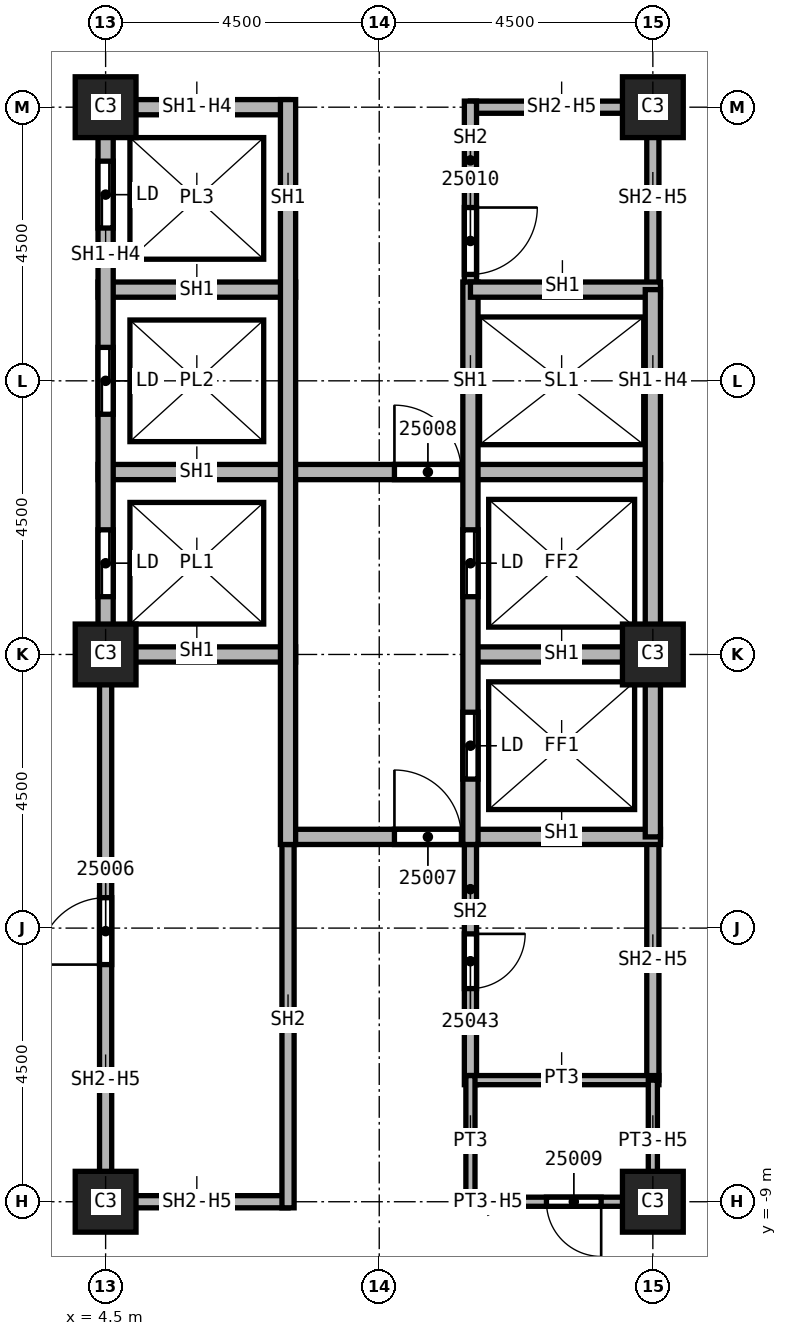
"""IFC4 building model, lengths in metres.
Left out: names, types, materials, properties, quantities, classifications, styles, units other than length and angle.
Written with IfcOpenShell. Run it as: python <this file> out.ifc"""

import sys

from ifc_helpers import new_model, si_unit, direction, frame, frame_2d, origin, origin_2d, place, context, subcontext, project, spatial, rectangle, extrude, element, fill, save


model = new_model("IFC4")
c1 = context("Model", 3, precision=1e-05, world=origin(), true_north=direction((0.0, 1.0)))
c2 = subcontext(c1, "Body", "Model", "MODEL_VIEW")
j1 = project(units=[si_unit("LENGTHUNIT", "METRE"), si_unit("PLANEANGLEUNIT", "RADIAN")], contexts=[c1])
p1 = place(None, origin())
s1 = spatial("IfcSite", under=j1, at=p1, CompositionType="ELEMENT")
p2 = place(p1, origin())
s2 = spatial("IfcBuilding", under=s1, at=p2, CompositionType="ELEMENT")
p3 = place(p2, frame((0.0, 0.0, 60.0)))
s3 = spatial("IfcBuildingStorey", under=s2, at=p3, CompositionType="ELEMENT", Elevation=60.0)
for number, where, z_axis, x_axis in (
    (1, (4.5, 0.0, 0.0), (0.0, 0.0, 1.0), (1.0, 0.0, 0.0)),
    (2, (4.5, 9.0, 0.0), (0.0, 0.0, 1.0), (1.0, 0.0, 0.0)),
    (3, (4.5, -9.0, 0.0), (0.0, 0.0, 1.0), (1.0, 0.0, 0.0)),
    (4, (13.5, 0.0, 0.0), (0.0, 0.0, 1.0), (1.0, 0.0, 0.0)),
    (5, (13.5, 9.0, 0.0), (0.0, 0.0, 1.0), (1.0, 0.0, 0.0)),
    (6, (13.5, -9.0, 0.0), (0.0, 0.0, 1.0), (1.0, 0.0, 0.0)),
):
    element("IfcColumn", number, at=place(p3, frame(where, z_axis=z_axis, x_axis=x_axis)), inside=s3, PredefinedType="COLUMN", context=c2, shape_type="SweptSolid", body=[
        extrude(rectangle(XDim=1.0, YDim=1.0, at=origin_2d()), origin(), (0.0, 0.0, 1.0), 7.7),
    ])
p4 = place(p3, frame((4.5, -9.1, 0.0), z_axis=(0.0, 0.0, 1.0), x_axis=(0.0, 1.0, 0.0)))
e7 = element("IfcWall", 7, at=p4, inside=s3, PredefinedType="SOLIDWALL", context=c2, shape_type="SweptSolid", body=[
    extrude(rectangle(XDim=9.1, YDim=0.2, at=frame_2d((4.55, 0.0))), origin(), (0.0, 0.0, 1.0), 6.938),
])
p5 = place(p4, frame((4.0, 0.0, 0.0)))
e8 = element("IfcOpeningElement", 8, at=p5, cuts=e7, PredefinedType="OPENING", context=c2, shape_type="SweptSolid", body=[
    extrude(rectangle(XDim=1.1, YDim=2.1, at=frame_2d((0.55, 1.05))), frame((0.0, 0.1, 0.0), z_axis=(0.0, -1.0, 0.0), x_axis=(1.0, 0.0, 0.0)), (0.0, 0.0, 1.0), 0.2),
])
p6 = place(p3, frame((7.5, -9.0, 0.0), z_axis=(0.0, 0.0, 1.0), x_axis=(-1.0, 0.0, 0.0)))
e9 = element("IfcWall", 9, at=p6, inside=s3, PredefinedType="SOLIDWALL", context=c2, shape_type="SweptSolid", body=[
    extrude(rectangle(XDim=3.0, YDim=0.2, at=frame_2d((1.5, 0.0))), origin(), (0.0, 0.0, 1.0), 6.938),
])
p7 = place(p3, frame((7.5, -2.875, 0.0), z_axis=(0.0, 0.0, 1.0), x_axis=(0.0, -1.0, 0.0)))
e10 = element("IfcWall", 10, at=p7, inside=s3, PredefinedType="SOLIDWALL", context=c2, shape_type="SweptSolid", body=[
    extrude(rectangle(XDim=6.225, YDim=0.2, at=frame_2d((3.113, 0.0))), origin(), (0.0, 0.0, 1.0), 7.7),
])
p8 = place(p3, frame((10.5, -2.875, 0.0), z_axis=(0.0, 0.0, 1.0), x_axis=(0.0, -1.0, 0.0)))
e11 = element("IfcWall", 11, at=p8, inside=s3, PredefinedType="SOLIDWALL", context=c2, shape_type="SweptSolid", body=[
    extrude(rectangle(XDim=4.2, YDim=0.2, at=frame_2d((2.1, 0.0))), origin(), (0.0, 0.0, 1.0), 7.7),
])
p9 = place(p8, frame((1.72, 0.0, 0.0)))
e12 = element("IfcOpeningElement", 12, at=p9, cuts=e11, PredefinedType="OPENING", context=c2, shape_type="SweptSolid", body=[
    extrude(rectangle(XDim=0.9, YDim=2.1, at=frame_2d((0.45, 1.05))), frame((0.0, 0.1, 0.0), z_axis=(0.0, -1.0, 0.0), x_axis=(1.0, 0.0, 0.0)), (0.0, 0.0, 1.0), 0.2),
])
p10 = place(p3, frame((10.5, 9.0, 0.0), z_axis=(0.0, 0.0, 1.0), x_axis=(1.0, 0.0, 0.0)))
e13 = element("IfcWall", 13, at=p10, inside=s3, PredefinedType="SOLIDWALL", context=c2, shape_type="SweptSolid", body=[
    extrude(rectangle(XDim=3.0, YDim=0.2, at=frame_2d((1.5, 0.0))), origin(), (0.0, 0.0, 1.0), 6.938),
])
p11 = place(p3, frame((10.5, 9.1, 0.0), z_axis=(0.0, 0.0, 1.0), x_axis=(0.0, -1.0, 0.0)))
e14 = element("IfcWall", 14, at=p11, inside=s3, PredefinedType="SOLIDWALL", context=c2, shape_type="SweptSolid", body=[
    extrude(rectangle(XDim=3.225, YDim=0.2, at=frame_2d((1.613, 0.0))), origin(), (0.0, 0.0, 1.0), 7.7),
])
p12 = place(p11, frame((1.75, 0.0, 0.0)))
e15 = element("IfcOpeningElement", 15, at=p12, cuts=e14, PredefinedType="OPENING", context=c2, shape_type="SweptSolid", body=[
    extrude(rectangle(XDim=1.1, YDim=2.1, at=frame_2d((0.55, 1.05))), frame((0.0, 0.1, 0.0), z_axis=(0.0, -1.0, 0.0), x_axis=(1.0, 0.0, 0.0)), (0.0, 0.0, 1.0), 0.2),
])
p13 = place(p3, frame((13.5, -3.0, 0.0), z_axis=(0.0, 0.0, 1.0), x_axis=(0.0, -1.0, 0.0)))
e16 = element("IfcWall", 16, at=p13, inside=s3, PredefinedType="SOLIDWALL", context=c2, shape_type="SweptSolid", body=[
    extrude(rectangle(XDim=4.0, YDim=0.2, at=frame_2d((2.0, 0.0))), origin(), (0.0, 0.0, 1.0), 6.938),
])
p14 = place(p3, frame((13.5, 9.1, 0.0), z_axis=(0.0, 0.0, 1.0), x_axis=(0.0, -1.0, 0.0)))
e17 = element("IfcWall", 17, at=p14, inside=s3, PredefinedType="SOLIDWALL", context=c2, shape_type="SweptSolid", body=[
    extrude(rectangle(XDim=3.1, YDim=0.2, at=frame_2d((1.55, 0.0))), origin(), (0.0, 0.0, 1.0), 6.938),
])
p15 = place(p3, frame((4.375, 0.0, 0.0), z_axis=(0.0, 0.0, 1.0), x_axis=(1.0, 0.0, 0.0)))
e18 = element("IfcWall", 18, at=p15, inside=s3, PredefinedType="SOLIDWALL", context=c2, shape_type="SweptSolid", body=[
    extrude(rectangle(XDim=3.25, YDim=0.25, at=frame_2d((1.625, 0.0))), origin(), (0.0, 0.0, 1.0), 7.7),
])
p16 = place(p3, frame((4.375, 3.0, 0.0), z_axis=(0.0, 0.0, 1.0), x_axis=(1.0, 0.0, 0.0)))
e19 = element("IfcWall", 19, at=p16, inside=s3, PredefinedType="SOLIDWALL", context=c2, shape_type="SweptSolid", body=[
    extrude(rectangle(XDim=9.25, YDim=0.25, at=frame_2d((4.625, 0.0))), origin(), (0.0, 0.0, 1.0), 7.7),
])
p17 = place(p16, frame((4.875, 0.0, 0.0)))
e20 = element("IfcOpeningElement", 20, at=p17, cuts=e19, PredefinedType="OPENING", context=c2, shape_type="SweptSolid", body=[
    extrude(rectangle(XDim=1.1, YDim=2.1, at=frame_2d((0.55, 1.05))), frame((0.0, 0.125, 0.0), z_axis=(0.0, -1.0, 0.0), x_axis=(1.0, 0.0, 0.0)), (0.0, 0.0, 1.0), 0.25),
])
p18 = place(p3, frame((4.375, 6.0, 0.0), z_axis=(0.0, 0.0, 1.0), x_axis=(1.0, 0.0, 0.0)))
e21 = element("IfcWall", 21, at=p18, inside=s3, PredefinedType="SOLIDWALL", context=c2, shape_type="SweptSolid", body=[
    extrude(rectangle(XDim=3.25, YDim=0.25, at=frame_2d((1.625, 0.0))), origin(), (0.0, 0.0, 1.0), 7.7),
])
p19 = place(p3, frame((4.5, 0.0, 0.0), z_axis=(0.0, 0.0, 1.0), x_axis=(0.0, 1.0, 0.0)))
e22 = element("IfcWall", 22, at=p19, inside=s3, PredefinedType="SOLIDWALL", context=c2, shape_type="SweptSolid", body=[
    extrude(rectangle(XDim=9.125, YDim=0.25, at=frame_2d((4.562, 0.0))), origin(), (0.0, 0.0, 1.0), 6.938),
])
p20 = place(p19, frame((0.95, 0.0, 0.0)))
e23 = element("IfcOpeningElement", 23, at=p20, cuts=e22, PredefinedType="OPENING", context=c2, shape_type="SweptSolid", body=[
    extrude(rectangle(XDim=1.1, YDim=2.1, at=frame_2d((0.55, 1.05))), frame((0.0, 0.125, 0.0), z_axis=(0.0, -1.0, 0.0), x_axis=(1.0, 0.0, 0.0)), (0.0, 0.0, 1.0), 0.25),
])
p21 = place(p19, frame((3.95, 0.0, 0.0)))
e24 = element("IfcOpeningElement", 24, at=p21, cuts=e22, PredefinedType="OPENING", context=c2, shape_type="SweptSolid", body=[
    extrude(rectangle(XDim=1.1, YDim=2.1, at=frame_2d((0.55, 1.05))), frame((0.0, 0.125, 0.0), z_axis=(0.0, -1.0, 0.0), x_axis=(1.0, 0.0, 0.0)), (0.0, 0.0, 1.0), 0.25),
])
p22 = place(p19, frame((7.012, 0.0, 0.0)))
e25 = element("IfcOpeningElement", 25, at=p22, cuts=e22, PredefinedType="OPENING", context=c2, shape_type="SweptSolid", body=[
    extrude(rectangle(XDim=1.1, YDim=2.1, at=frame_2d((0.55, 1.05))), frame((0.0, 0.125, 0.0), z_axis=(0.0, -1.0, 0.0), x_axis=(1.0, 0.0, 0.0)), (0.0, 0.0, 1.0), 0.25),
])
p23 = place(p3, frame((4.5, 9.0, 0.0), z_axis=(0.0, 0.0, 1.0), x_axis=(1.0, 0.0, 0.0)))
e26 = element("IfcWall", 26, at=p23, inside=s3, PredefinedType="SOLIDWALL", context=c2, shape_type="SweptSolid", body=[
    extrude(rectangle(XDim=3.0, YDim=0.25, at=frame_2d((1.5, 0.0))), origin(), (0.0, 0.0, 1.0), 6.938),
])
p24 = place(p3, frame((7.5, -3.0, 0.0), z_axis=(0.0, 0.0, 1.0), x_axis=(1.0, 0.0, 0.0)))
e27 = element("IfcWall", 27, at=p24, inside=s3, PredefinedType="SOLIDWALL", context=c2, shape_type="SweptSolid", body=[
    extrude(rectangle(XDim=6.125, YDim=0.25, at=frame_2d((3.062, 0.0))), origin(), (0.0, 0.0, 1.0), 7.7),
])
p25 = place(p24, frame((1.75, 0.0, 0.0)))
e28 = element("IfcOpeningElement", 28, at=p25, cuts=e27, PredefinedType="OPENING", context=c2, shape_type="SweptSolid", body=[
    extrude(rectangle(XDim=1.1, YDim=2.1, at=frame_2d((0.55, 1.05))), frame((0.0, 0.125, 0.0), z_axis=(0.0, -1.0, 0.0), x_axis=(1.0, 0.0, 0.0)), (0.0, 0.0, 1.0), 0.25),
])
p26 = place(p3, frame((7.5, 9.125, 0.0), z_axis=(0.0, 0.0, 1.0), x_axis=(0.0, -1.0, 0.0)))
e29 = element("IfcWall", 29, at=p26, inside=s3, PredefinedType="SOLIDWALL", context=c2, shape_type="SweptSolid", body=[
    extrude(rectangle(XDim=12.25, YDim=0.25, at=frame_2d((6.125, 0.0))), origin(), (0.0, 0.0, 1.0), 7.7),
])
p27 = place(p3, frame((10.5, 0.0, 0.0), z_axis=(0.0, 0.0, 1.0), x_axis=(1.0, 0.0, 0.0)))
e30 = element("IfcWall", 30, at=p27, inside=s3, PredefinedType="SOLIDWALL", context=c2, shape_type="SweptSolid", body=[
    extrude(rectangle(XDim=3.125, YDim=0.25, at=frame_2d((1.562, 0.0))), origin(), (0.0, 0.0, 1.0), 7.7),
])
p28 = place(p3, frame((10.5, 6.125, 0.0), z_axis=(0.0, 0.0, 1.0), x_axis=(0.0, -1.0, 0.0)))
e31 = element("IfcWall", 31, at=p28, inside=s3, PredefinedType="SOLIDWALL", context=c2, shape_type="SweptSolid", body=[
    extrude(rectangle(XDim=9.25, YDim=0.25, at=frame_2d((4.625, 0.0))), origin(), (0.0, 0.0, 1.0), 7.7),
])
p29 = place(p28, frame((7.075, 0.0, 0.0)))
e32 = element("IfcOpeningElement", 32, at=p29, cuts=e31, PredefinedType="OPENING", context=c2, shape_type="SweptSolid", body=[
    extrude(rectangle(XDim=1.1, YDim=2.1, at=frame_2d((0.55, 1.05))), frame((0.0, 0.125, 0.0), z_axis=(0.0, -1.0, 0.0), x_axis=(1.0, 0.0, 0.0)), (0.0, 0.0, 1.0), 0.25),
])
p30 = place(p28, frame((4.075, 0.0, 0.0)))
e33 = element("IfcOpeningElement", 33, at=p30, cuts=e31, PredefinedType="OPENING", context=c2, shape_type="SweptSolid", body=[
    extrude(rectangle(XDim=1.1, YDim=2.1, at=frame_2d((0.55, 1.05))), frame((0.0, 0.125, 0.0), z_axis=(0.0, -1.0, 0.0), x_axis=(1.0, 0.0, 0.0)), (0.0, 0.0, 1.0), 0.25),
])
p31 = place(p3, frame((10.5, 6.0, 0.0), z_axis=(0.0, 0.0, 1.0), x_axis=(1.0, 0.0, 0.0)))
e34 = element("IfcWall", 34, at=p31, inside=s3, PredefinedType="SOLIDWALL", context=c2, shape_type="SweptSolid", body=[
    extrude(rectangle(XDim=3.125, YDim=0.25, at=frame_2d((1.562, 0.0))), origin(), (0.0, 0.0, 1.0), 7.7),
])
p32 = place(p3, frame((13.5, 6.0, 0.0), z_axis=(0.0, 0.0, 1.0), x_axis=(0.0, -1.0, 0.0)))
e35 = element("IfcWall", 35, at=p32, inside=s3, PredefinedType="SOLIDWALL", context=c2, shape_type="SweptSolid", body=[
    extrude(rectangle(XDim=9.0, YDim=0.25, at=frame_2d((4.5, 0.0))), origin(), (0.0, 0.0, 1.0), 6.938),
])
p33 = place(p3, frame((10.5, -7.0, 0.0), z_axis=(0.0, 0.0, 1.0), x_axis=(1.0, 0.0, 0.0)))
e36 = element("IfcWall", 36, at=p33, inside=s3, PredefinedType="PARTITIONING", context=c2, shape_type="SweptSolid", body=[
    extrude(rectangle(XDim=3.1, YDim=0.15, at=frame_2d((1.55, 0.0))), origin(), (0.0, 0.0, 1.0), 7.7),
])
p34 = place(p3, frame((10.5, -6.925, 0.0), z_axis=(0.0, 0.0, 1.0), x_axis=(0.0, -1.0, 0.0)))
e37 = element("IfcWall", 37, at=p34, inside=s3, PredefinedType="PARTITIONING", context=c2, shape_type="SweptSolid", body=[
    extrude(rectangle(XDim=2.15, YDim=0.15, at=frame_2d((1.075, 0.0))), origin(), (0.0, 0.0, 1.0), 7.7),
])
p35 = place(p3, frame((13.5, -9.0, 0.0), z_axis=(0.0, 0.0, 1.0), x_axis=(-1.0, 0.0, 0.0)))
e38 = element("IfcWall", 38, at=p35, inside=s3, PredefinedType="PARTITIONING", context=c2, shape_type="SweptSolid", body=[
    extrude(rectangle(XDim=3.0, YDim=0.15, at=frame_2d((1.5, 0.0))), origin(), (0.0, 0.0, 1.0), 6.938),
])
p36 = place(p35, frame((0.85, 0.0, 0.0)))
e39 = element("IfcOpeningElement", 39, at=p36, cuts=e38, PredefinedType="OPENING", context=c2, shape_type="SweptSolid", body=[
    extrude(rectangle(XDim=0.9, YDim=2.1, at=frame_2d((0.45, 1.05))), frame((0.0, 0.075, 0.0), z_axis=(0.0, -1.0, 0.0), x_axis=(1.0, 0.0, 0.0)), (0.0, 0.0, 1.0), 0.15),
])
p37 = place(p3, frame((13.5, -7.0, 0.0), z_axis=(0.0, 0.0, 1.0), x_axis=(0.0, -1.0, 0.0)))
e40 = element("IfcWall", 40, at=p37, inside=s3, PredefinedType="PARTITIONING", context=c2, shape_type="SweptSolid", body=[
    extrude(rectangle(XDim=2.075, YDim=0.15, at=frame_2d((1.038, 0.0))), origin(), (0.0, 0.0, 1.0), 6.938),
])
p38 = place(p5, origin())
e41 = element("IfcDoor", 41, at=p38, inside=s3, OperationType="SINGLE_SWING_LEFT", PredefinedType="DOOR", context=c2, shape_type="SweptSolid", body=[
    extrude(rectangle(XDim=1.1, YDim=2.1, at=frame_2d((0.55, 1.05))), frame((0.0, 0.025, 0.0), z_axis=(0.0, -1.0, 0.0), x_axis=(1.0, 0.0, 0.0)), (0.0, 0.0, 1.0), 0.05),
])
fill(e8, e41)
p39 = place(p25, origin())
e42 = element("IfcDoor", 42, at=p39, inside=s3, OperationType="SINGLE_SWING_RIGHT", PredefinedType="DOOR", context=c2, shape_type="SweptSolid", body=[
    extrude(rectangle(XDim=1.1, YDim=2.1, at=frame_2d((0.55, 1.05))), frame((0.0, 0.025, 0.0), z_axis=(0.0, -1.0, 0.0), x_axis=(1.0, 0.0, 0.0)), (0.0, 0.0, 1.0), 0.05),
])
fill(e28, e42)
p40 = place(p17, origin())
e43 = element("IfcDoor", 43, at=p40, inside=s3, OperationType="SINGLE_SWING_LEFT", PredefinedType="DOOR", context=c2, shape_type="SweptSolid", body=[
    extrude(rectangle(XDim=1.1, YDim=2.1, at=frame_2d((0.55, 1.05))), frame((0.0, 0.025, 0.0), z_axis=(0.0, -1.0, 0.0), x_axis=(1.0, 0.0, 0.0)), (0.0, 0.0, 1.0), 0.05),
])
fill(e20, e43)
p41 = place(p36, origin())
e44 = element("IfcDoor", 44, at=p41, inside=s3, OperationType="SINGLE_SWING_RIGHT", PredefinedType="DOOR", context=c2, shape_type="SweptSolid", body=[
    extrude(rectangle(XDim=0.9, YDim=2.1, at=frame_2d((0.45, 1.05))), frame((0.0, 0.025, 0.0), z_axis=(0.0, -1.0, 0.0), x_axis=(1.0, 0.0, 0.0)), (0.0, 0.0, 1.0), 0.05),
])
fill(e39, e44)
p42 = place(p12, origin())
e45 = element("IfcDoor", 45, at=p42, inside=s3, OperationType="SINGLE_SWING_LEFT", PredefinedType="DOOR", context=c2, shape_type="SweptSolid", body=[
    extrude(rectangle(XDim=1.1, YDim=2.1, at=frame_2d((0.55, 1.05))), frame((0.0, 0.025, 0.0), z_axis=(0.0, -1.0, 0.0), x_axis=(1.0, 0.0, 0.0)), (0.0, 0.0, 1.0), 0.05),
])
fill(e15, e45)
p43 = place(p9, origin())
e46 = element("IfcDoor", 46, at=p43, inside=s3, OperationType="SINGLE_SWING_LEFT", PredefinedType="DOOR", context=c2, shape_type="SweptSolid", body=[
    extrude(rectangle(XDim=0.9, YDim=2.1, at=frame_2d((0.45, 1.05))), frame((0.0, 0.025, 0.0), z_axis=(0.0, -1.0, 0.0), x_axis=(1.0, 0.0, 0.0)), (0.0, 0.0, 1.0), 0.05),
])
fill(e12, e46)
p44 = place(p20, origin())
e47 = element("IfcDoor", 47, at=p44, inside=s3, OperationType="SLIDING_TO_LEFT", PredefinedType="DOOR", context=c2, shape_type="SweptSolid", body=[
    extrude(rectangle(XDim=1.1, YDim=2.1, at=frame_2d((0.55, 1.05))), frame((0.0, 0.025, 0.0), z_axis=(0.0, -1.0, 0.0), x_axis=(1.0, 0.0, 0.0)), (0.0, 0.0, 1.0), 0.05),
])
fill(e23, e47)
p45 = place(p21, origin())
e48 = element("IfcDoor", 48, at=p45, inside=s3, OperationType="SLIDING_TO_LEFT", PredefinedType="DOOR", context=c2, shape_type="SweptSolid", body=[
    extrude(rectangle(XDim=1.1, YDim=2.1, at=frame_2d((0.55, 1.05))), frame((0.0, 0.025, 0.0), z_axis=(0.0, -1.0, 0.0), x_axis=(1.0, 0.0, 0.0)), (0.0, 0.0, 1.0), 0.05),
])
fill(e24, e48)
p46 = place(p22, origin())
e49 = element("IfcDoor", 49, at=p46, inside=s3, OperationType="SLIDING_TO_LEFT", PredefinedType="DOOR", context=c2, shape_type="SweptSolid", body=[
    extrude(rectangle(XDim=1.1, YDim=2.1, at=frame_2d((0.55, 1.05))), frame((0.0, 0.025, 0.0), z_axis=(0.0, -1.0, 0.0), x_axis=(1.0, 0.0, 0.0)), (0.0, 0.0, 1.0), 0.05),
])
fill(e25, e49)
p47 = place(p29, origin())
e50 = element("IfcDoor", 50, at=p47, inside=s3, OperationType="SLIDING_TO_LEFT", PredefinedType="DOOR", context=c2, shape_type="SweptSolid", body=[
    extrude(rectangle(XDim=1.1, YDim=2.1, at=frame_2d((0.55, 1.05))), frame((0.0, 0.025, 0.0), z_axis=(0.0, -1.0, 0.0), x_axis=(1.0, 0.0, 0.0)), (0.0, 0.0, 1.0), 0.05),
])
fill(e32, e50)
p48 = place(p30, origin())
e51 = element("IfcDoor", 51, at=p48, inside=s3, OperationType="SLIDING_TO_LEFT", PredefinedType="DOOR", context=c2, shape_type="SweptSolid", body=[
    extrude(rectangle(XDim=1.1, YDim=2.1, at=frame_2d((0.55, 1.05))), frame((0.0, 0.025, 0.0), z_axis=(0.0, -1.0, 0.0), x_axis=(1.0, 0.0, 0.0)), (0.0, 0.0, 1.0), 0.05),
])
fill(e33, e51)
save(model, sys.argv[1])
